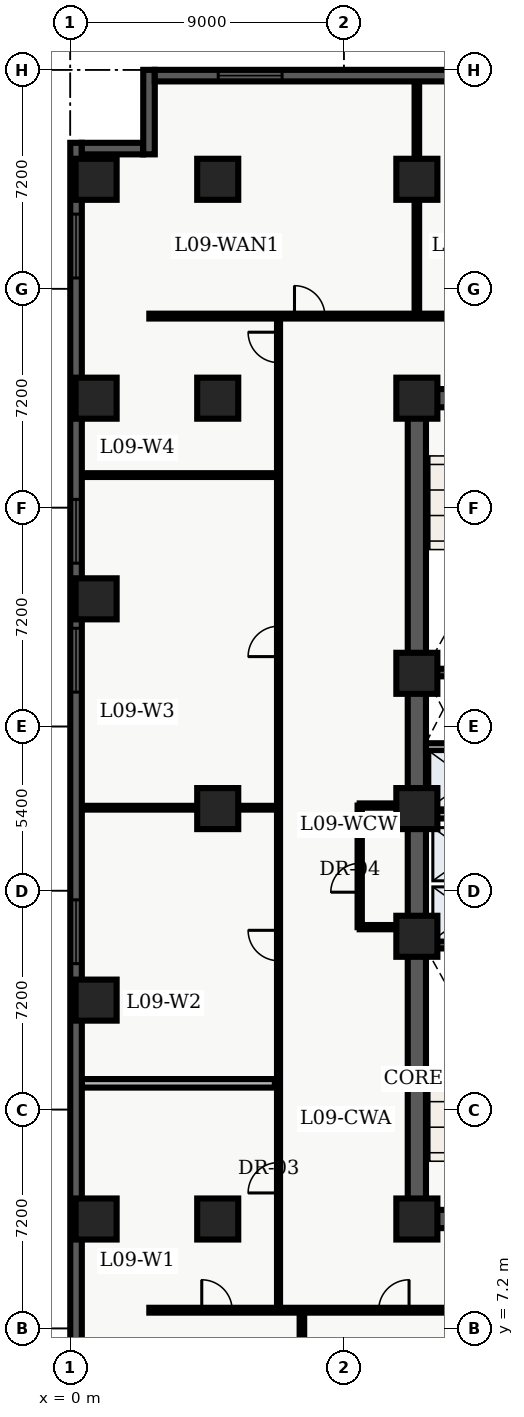
"""IFC4 building model, lengths in metres.
Left out: names, types, materials, properties, quantities, classifications, styles, units other than length and angle.
Written with IfcOpenShell. Run it as: python <this file> out.ifc"""

import sys

from ifc_helpers import new_model, entity, si_unit, converted_unit, direction, frame, origin_with_axes, origin_2d_with_axis, place, context, subcontext, project, spatial, polyline, rectangle, outline, extrude, element, fill, save


model = new_model("IFC4")
c1 = context("Model", 3, precision=1e-05, world=origin_with_axes(), true_north=direction((0.0, 1.0)))
c2 = subcontext(c1, "Body", "Model", "MODEL_VIEW")
j1 = project(units=[si_unit("LENGTHUNIT", "METRE"), converted_unit("PLANEANGLEUNIT", "DEGREE", entity("IfcPlaneAngleMeasure", 0.017), si_unit("PLANEANGLEUNIT", "RADIAN"), dimensions=[0, 0, 0, 0, 0, 0, 0])], contexts=[c1])
p1 = place(None, origin_with_axes())
s1 = spatial("IfcSite", under=j1, at=p1, CompositionType="ELEMENT")
p2 = place(p1, origin_with_axes())
s2 = spatial("IfcBuilding", under=s1, at=p2, CompositionType="ELEMENT")
p3 = place(p2, frame((0.0, 0.0, 40.5), z_axis=(0.0, 0.0, 1.0), x_axis=(1.0, 0.0, 0.0)))
s3 = spatial("IfcBuildingStorey", under=s2, at=p3, CompositionType="ELEMENT", Elevation=40.5)
p4 = place(p3, frame((11.4, 10.8, 0.0), z_axis=(0.0, 0.0, 1.0), x_axis=(0.0, 1.0, 0.0)))
e1 = element("IfcWall", 1, at=p4, inside=s3, PredefinedType="SHEAR", context=c2, shape_type="SweptSolid", body=[
    extrude(outline(polyline([(0.0, -0.3), (27.0, -0.3), (27.0, 0.3), (0.0, 0.3), (0.0, -0.3)])), origin_with_axes(), (0.0, 0.0, 1.0), 3.66),
])
p5 = place(p3, frame((11.4, 10.8, 0.0), z_axis=(0.0, 0.0, 1.0), x_axis=(1.0, 0.0, 0.0)))
e2 = element("IfcWall", 2, at=p5, inside=s3, PredefinedType="SHEAR", context=c2, shape_type="SweptSolid", body=[
    extrude(outline(polyline([(0.0, -0.3), (7.2, -0.3), (7.2, 0.3), (0.0, 0.3), (0.0, -0.3)])), origin_with_axes(), (0.0, 0.0, 1.0), 3.66),
])
p6 = place(p5, frame((2.625, 0.0, 0.0), z_axis=(0.0, 0.0, 1.0), x_axis=(1.0, 0.0, 0.0)))
e3 = element("IfcOpeningElement", 3, at=p6, cuts=e2, PredefinedType="OPENING", context=c2, shape_type="SweptSolid", body=[
    extrude(rectangle(XDim=1.05, YDim=0.62, at=origin_2d_with_axis()), origin_with_axes(), (0.0, 0.0, 1.0), 2.15),
])
p7 = place(p3, frame((11.4, 37.8, 0.0), z_axis=(0.0, 0.0, 1.0), x_axis=(1.0, 0.0, 0.0)))
e4 = element("IfcWall", 4, at=p7, inside=s3, PredefinedType="SHEAR", context=c2, shape_type="SweptSolid", body=[
    extrude(outline(polyline([(0.0, -0.3), (7.2, -0.3), (7.2, 0.3), (0.0, 0.3), (0.0, -0.3)])), origin_with_axes(), (0.0, 0.0, 1.0), 3.66),
])
p8 = place(p7, frame((2.625, 0.0, 0.0), z_axis=(0.0, 0.0, 1.0), x_axis=(1.0, 0.0, 0.0)))
e5 = element("IfcOpeningElement", 5, at=p8, cuts=e4, PredefinedType="OPENING", context=c2, shape_type="SweptSolid", body=[
    extrude(rectangle(XDim=1.05, YDim=0.62, at=origin_2d_with_axis()), origin_with_axes(), (0.0, 0.0, 1.0), 2.15),
])
for number, where, z_axis, x_axis in (
    (6, (11.7, 19.825, 0.0), (0.0, 0.0, 1.0), (1.0, 0.0, 0.0)),
    (7, (11.7, 28.775, 0.0), (0.0, 0.0, 1.0), (1.0, 0.0, 0.0)),
):
    element("IfcWall", number, at=place(p3, frame(where, z_axis=z_axis, x_axis=x_axis)), inside=s3, PredefinedType="SHEAR", context=c2, shape_type="SweptSolid", body=[
        extrude(outline(polyline([(0.0, -0.125), (6.6, -0.125), (6.6, 0.125), (0.0, 0.125), (0.0, -0.125)])), origin_with_axes(), (0.0, 0.0, 1.0), 3.66),
    ])
p9 = place(p3, frame((11.7, 24.1, 0.0), z_axis=(0.0, 0.0, 1.0), x_axis=(1.0, 0.0, 0.0)))
e8 = element("IfcWall", 8, at=p9, inside=s3, PredefinedType="SOLIDWALL", context=c2, shape_type="SweptSolid", body=[
    extrude(outline(polyline([(0.0, -0.125), (6.6, -0.125), (6.6, 0.125), (0.0, 0.125), (0.0, -0.125)])), origin_with_axes(), (0.0, 0.0, 1.0), 2.7),
])
p10 = place(p9, frame((3.75, 0.0, 0.0), z_axis=(0.0, 0.0, 1.0), x_axis=(1.0, 0.0, 0.0)))
e9 = element("IfcOpeningElement", 9, at=p10, cuts=e8, PredefinedType="OPENING", context=c2, shape_type="SweptSolid", body=[
    extrude(rectangle(XDim=0.9, YDim=0.27, at=origin_2d_with_axis()), origin_with_axes(), (0.0, 0.0, 1.0), 2.15),
])
p11 = place(p3, frame((11.7, 26.325, 0.0), z_axis=(0.0, 0.0, 1.0), x_axis=(1.0, 0.0, 0.0)))
e10 = element("IfcWall", 10, at=p11, inside=s3, PredefinedType="SOLIDWALL", context=c2, shape_type="SweptSolid", body=[
    extrude(outline(polyline([(0.0, -0.125), (6.6, -0.125), (6.6, 0.125), (0.0, 0.125), (0.0, -0.125)])), origin_with_axes(), (0.0, 0.0, 1.0), 2.7),
])
p12 = place(p11, frame((3.5, 0.0, 0.0), z_axis=(0.0, 0.0, 1.0), x_axis=(1.0, 0.0, 0.0)))
e11 = element("IfcOpeningElement", 11, at=p12, cuts=e10, PredefinedType="OPENING", context=c2, shape_type="SweptSolid", body=[
    extrude(rectangle(XDim=0.9, YDim=0.27, at=origin_2d_with_axis()), origin_with_axes(), (0.0, 0.0, 1.0), 2.15),
])
for number, where, z_axis, x_axis in (
    (12, (11.4, 10.8, 0.0), (0.0, 0.0, 1.0), (1.0, 0.0, 0.0)),
    (13, (11.4, 20.1, 0.0), (0.0, 0.0, 1.0), (1.0, 0.0, 0.0)),
    (14, (11.4, 24.3, 0.0), (0.0, 0.0, 1.0), (1.0, 0.0, 0.0)),
    (15, (11.4, 28.75, 0.0), (0.0, 0.0, 1.0), (1.0, 0.0, 0.0)),
    (16, (11.4, 37.8, 0.0), (0.0, 0.0, 1.0), (1.0, 0.0, 0.0)),
    (17, (11.4, 45.0, 0.0), (0.0, 0.0, 1.0), (1.0, 0.0, 0.0)),
    (18, (4.85, 10.8, 0.0), (0.0, 0.0, 1.0), (1.0, 0.0, 0.0)),
    (19, (4.85, 24.3, 0.0), (0.0, 0.0, 1.0), (1.0, 0.0, 0.0)),
    (20, (4.85, 37.8, 0.0), (0.0, 0.0, 1.0), (1.0, 0.0, 0.0)),
    (21, (4.85, 45.0, 0.0), (0.0, 0.0, 1.0), (1.0, 0.0, 0.0)),
    (22, (0.85, 10.8, 0.0), (0.0, 0.0, 1.0), (1.0, 0.0, 0.0)),
    (23, (0.85, 18.0, 0.0), (0.0, 0.0, 1.0), (1.0, 0.0, 0.0)),
    (24, (0.85, 31.2, 0.0), (0.0, 0.0, 1.0), (1.0, 0.0, 0.0)),
    (25, (0.85, 37.8, 0.0), (0.0, 0.0, 1.0), (1.0, 0.0, 0.0)),
    (26, (0.85, 45.0, 0.0), (0.0, 0.0, 1.0), (1.0, 0.0, 0.0)),
):
    element("IfcColumn", number, at=place(p3, frame(where, z_axis=z_axis, x_axis=x_axis)), inside=s3, PredefinedType="COLUMN", context=c2, shape_type="SweptSolid", body=[
        extrude(rectangle(XDim=1.35, YDim=1.35, at=origin_2d_with_axis()), origin_with_axes(), (0.0, 0.0, 1.0), 3.9),
    ])
p13 = place(p3, frame((9.52, 20.4, 0.0), z_axis=(0.0, 0.0, 1.0), x_axis=(0.0, 1.0, 0.0)))
e27 = element("IfcWall", 27, at=p13, inside=s3, PredefinedType="PARTITIONING", context=c2, shape_type="SweptSolid", body=[
    extrude(outline(polyline([(0.0, -0.07), (4.0, -0.07), (4.0, 0.07), (0.0, 0.07), (0.0, -0.07)])), origin_with_axes(), (0.0, 0.0, 1.0), 2.7),
])
p14 = place(p13, frame((1.625, 0.0, 0.0), z_axis=(0.0, 0.0, 1.0), x_axis=(1.0, 0.0, 0.0)))
e28 = element("IfcOpeningElement", 28, at=p14, cuts=e27, PredefinedType="OPENING", context=c2, shape_type="SweptSolid", body=[
    extrude(rectangle(XDim=0.95, YDim=0.16, at=origin_2d_with_axis()), origin_with_axes(), (0.0, 0.0, 1.0), 2.15),
])
for number, where, z_axis, x_axis in (
    (29, (9.52, 20.4, 0.0), (0.0, 0.0, 1.0), (1.0, 0.0, 0.0)),
    (30, (9.52, 24.4, 0.0), (0.0, 0.0, 1.0), (1.0, 0.0, 0.0)),
):
    element("IfcWall", number, at=place(p3, frame(where, z_axis=z_axis, x_axis=x_axis)), inside=s3, PredefinedType="PARTITIONING", context=c2, shape_type="SweptSolid", body=[
        extrude(outline(polyline([(0.0, -0.07), (1.58, -0.07), (1.58, 0.07), (0.0, 0.07), (0.0, -0.07)])), origin_with_axes(), (0.0, 0.0, 1.0), 2.7),
    ])
p15 = place(p3, frame((2.6, 7.8, 0.0), z_axis=(0.0, 0.0, 1.0), x_axis=(1.0, 0.0, 0.0)))
e31 = element("IfcWall", 31, at=p15, inside=s3, PredefinedType="PARTITIONING", context=c2, shape_type="SweptSolid", body=[
    extrude(outline(polyline([(0.0, -0.08), (18.55, -0.08), (18.55, 0.08), (0.0, 0.08), (0.0, -0.08)])), origin_with_axes(), (0.0, 0.0, 1.0), 2.7),
])
p16 = place(p15, frame((2.225, 0.0, 0.0), z_axis=(0.0, 0.0, 1.0), x_axis=(1.0, 0.0, 0.0)))
e32 = element("IfcOpeningElement", 32, at=p16, cuts=e31, PredefinedType="OPENING", context=c2, shape_type="SweptSolid", body=[
    extrude(rectangle(XDim=1.0, YDim=0.18, at=origin_2d_with_axis()), origin_with_axes(), (0.0, 0.0, 1.0), 2.15),
])
p17 = place(p15, frame((8.043, 0.0, 0.0), z_axis=(0.0, 0.0, 1.0), x_axis=(1.0, 0.0, 0.0)))
e33 = element("IfcOpeningElement", 33, at=p17, cuts=e31, PredefinedType="OPENING", context=c2, shape_type="SweptSolid", body=[
    extrude(rectangle(XDim=1.0, YDim=0.18, at=origin_2d_with_axis()), origin_with_axes(), (0.0, 0.0, 1.0), 2.15),
])
p18 = place(p15, frame((14.784, 0.0, 0.0), z_axis=(0.0, 0.0, 1.0), x_axis=(1.0, 0.0, 0.0)))
e34 = element("IfcOpeningElement", 34, at=p18, cuts=e31, PredefinedType="OPENING", context=c2, shape_type="SweptSolid", body=[
    extrude(rectangle(XDim=1.0, YDim=0.18, at=origin_2d_with_axis()), origin_with_axes(), (0.0, 0.0, 1.0), 2.15),
])
p19 = place(p3, frame((2.6, 40.5, 0.0), z_axis=(0.0, 0.0, 1.0), x_axis=(1.0, 0.0, 0.0)))
e35 = element("IfcWall", 35, at=p19, inside=s3, PredefinedType="PARTITIONING", context=c2, shape_type="SweptSolid", body=[
    extrude(outline(polyline([(0.0, -0.08), (18.65, -0.08), (18.65, 0.08), (0.0, 0.08), (0.0, -0.08)])), origin_with_axes(), (0.0, 0.0, 1.0), 2.7),
])
p20 = place(p19, frame((5.275, 0.0, 0.0), z_axis=(0.0, 0.0, 1.0), x_axis=(1.0, 0.0, 0.0)))
e36 = element("IfcOpeningElement", 36, at=p20, cuts=e35, PredefinedType="OPENING", context=c2, shape_type="SweptSolid", body=[
    extrude(rectangle(XDim=1.0, YDim=0.18, at=origin_2d_with_axis()), origin_with_axes(), (0.0, 0.0, 1.0), 2.15),
])
p21 = place(p19, frame((12.61, 0.0, 0.0), z_axis=(0.0, 0.0, 1.0), x_axis=(1.0, 0.0, 0.0)))
e37 = element("IfcOpeningElement", 37, at=p21, cuts=e35, PredefinedType="OPENING", context=c2, shape_type="SweptSolid", body=[
    extrude(rectangle(XDim=1.2, YDim=0.18, at=origin_2d_with_axis()), origin_with_axes(), (0.0, 0.0, 1.0), 2.2),
])
p22 = place(p3, frame((6.85, 7.8, 0.0), z_axis=(0.0, 0.0, 1.0), x_axis=(0.0, 1.0, 0.0)))
e38 = element("IfcWall", 38, at=p22, inside=s3, PredefinedType="PARTITIONING", context=c2, shape_type="SweptSolid", body=[
    extrude(outline(polyline([(0.0, -0.05), (32.7, -0.05), (32.7, 0.05), (0.0, 0.05), (0.0, -0.05)])), origin_with_axes(), (0.0, 0.0, 1.0), 2.7),
])
p23 = place(p22, frame((4.357, 0.0, 0.0), z_axis=(0.0, 0.0, 1.0), x_axis=(1.0, 0.0, 0.0)))
e39 = element("IfcOpeningElement", 39, at=p23, cuts=e38, PredefinedType="OPENING", context=c2, shape_type="SweptSolid", body=[
    extrude(rectangle(XDim=1.0, YDim=0.12, at=origin_2d_with_axis()), origin_with_axes(), (0.0, 0.0, 1.0), 2.15),
])
p24 = place(p22, frame((11.996, 0.0, 0.0), z_axis=(0.0, 0.0, 1.0), x_axis=(1.0, 0.0, 0.0)))
e40 = element("IfcOpeningElement", 40, at=p24, cuts=e38, PredefinedType="OPENING", context=c2, shape_type="SweptSolid", body=[
    extrude(rectangle(XDim=1.0, YDim=0.12, at=origin_2d_with_axis()), origin_with_axes(), (0.0, 0.0, 1.0), 2.15),
])
p25 = place(p22, frame((22.0, 0.0, 0.0), z_axis=(0.0, 0.0, 1.0), x_axis=(1.0, 0.0, 0.0)))
e41 = element("IfcOpeningElement", 41, at=p25, cuts=e38, PredefinedType="OPENING", context=c2, shape_type="SweptSolid", body=[
    extrude(rectangle(XDim=1.0, YDim=0.12, at=origin_2d_with_axis()), origin_with_axes(), (0.0, 0.0, 1.0), 2.15),
])
p26 = place(p22, frame((31.67, 0.0, 0.0), z_axis=(0.0, 0.0, 1.0), x_axis=(1.0, 0.0, 0.0)))
e42 = element("IfcOpeningElement", 42, at=p26, cuts=e38, PredefinedType="OPENING", context=c2, shape_type="SweptSolid", body=[
    extrude(rectangle(XDim=1.0, YDim=0.12, at=origin_2d_with_axis()), origin_with_axes(), (0.0, 0.0, 1.0), 2.15),
])
p27 = place(p3, frame((0.375, 15.263, 0.0), z_axis=(0.0, 0.0, 1.0), x_axis=(1.0, 0.0, 0.0)))
e43 = element("IfcWall", 43, at=p27, inside=s3, PredefinedType="PARTITIONING", context=c2, shape_type="SweptSolid", body=[
    extrude(outline(polyline([(0.0, -0.14), (6.355, -0.14), (6.355, 0.14), (0.0, 0.14), (0.0, -0.14)])), origin_with_axes(), (0.0, 0.0, 1.0), 2.7),
])
for number, where, z_axis, x_axis in (
    (44, (0.375, 24.329, 0.0), (0.0, 0.0, 1.0), (1.0, 0.0, 0.0)),
    (45, (0.375, 35.27, 0.0), (0.0, 0.0, 1.0), (1.0, 0.0, 0.0)),
):
    element("IfcWall", number, at=place(p3, frame(where, z_axis=z_axis, x_axis=x_axis)), inside=s3, PredefinedType="PARTITIONING", context=c2, shape_type="SweptSolid", body=[
        extrude(outline(polyline([(0.0, -0.062), (6.355, -0.062), (6.355, 0.062), (0.0, 0.062), (0.0, -0.062)])), origin_with_axes(), (0.0, 0.0, 1.0), 2.7),
    ])
p28 = place(p3, frame((7.619, 0.36, 0.0), z_axis=(0.0, 0.0, 1.0), x_axis=(0.0, 1.0, 0.0)))
e46 = element("IfcWall", 46, at=p28, inside=s3, PredefinedType="PARTITIONING", context=c2, shape_type="SweptSolid", body=[
    extrude(outline(polyline([(0.0, -0.075), (7.34, -0.075), (7.34, 0.075), (0.0, 0.075), (0.0, -0.075)])), origin_with_axes(), (0.0, 0.0, 1.0), 2.7),
])
p29 = place(p3, frame((11.4, 40.6, 0.0), z_axis=(0.0, 0.0, 1.0), x_axis=(0.0, 1.0, 0.0)))
e47 = element("IfcWall", 47, at=p29, inside=s3, PredefinedType="PARTITIONING", context=c2, shape_type="SweptSolid", body=[
    extrude(outline(polyline([(0.0, -0.075), (7.64, -0.075), (7.64, 0.075), (0.0, 0.075), (0.0, -0.075)])), origin_with_axes(), (0.0, 0.0, 1.0), 2.7),
])
p30 = place(p3, frame((0.19, 2.78, 0.0), z_axis=(0.0, 0.0, 1.0), x_axis=(0.0, 1.0, 0.0)))
e48 = element("IfcWall", 48, at=p30, inside=s3, PredefinedType="SOLIDWALL", context=c2, shape_type="SweptSolid", body=[
    extrude(outline(polyline([(0.0, -0.19), (43.42, -0.19), (43.42, 0.19), (0.0, 0.19), (0.0, -0.19)])), origin_with_axes(), (0.0, 0.0, 1.0), 3.66),
])
p31 = place(p30, frame((2.946, 0.0, 0.45), z_axis=(0.0, 0.0, 1.0), x_axis=(1.0, 0.0, 0.0)))
e49 = element("IfcOpeningElement", 49, at=p31, cuts=e48, PredefinedType="OPENING", context=c2, shape_type="SweptSolid", body=[
    extrude(rectangle(XDim=2.1, YDim=0.4, at=origin_2d_with_axis()), origin_with_axes(), (0.0, 0.0, 1.0), 2.2),
])
p32 = place(p30, frame((17.469, 0.0, 0.45), z_axis=(0.0, 0.0, 1.0), x_axis=(1.0, 0.0, 0.0)))
e50 = element("IfcOpeningElement", 50, at=p32, cuts=e48, PredefinedType="OPENING", context=c2, shape_type="SweptSolid", body=[
    extrude(rectangle(XDim=2.1, YDim=0.4, at=origin_2d_with_axis()), origin_with_axes(), (0.0, 0.0, 1.0), 2.2),
])
p33 = place(p30, frame((26.401, 0.0, 0.45), z_axis=(0.0, 0.0, 1.0), x_axis=(1.0, 0.0, 0.0)))
e51 = element("IfcOpeningElement", 51, at=p33, cuts=e48, PredefinedType="OPENING", context=c2, shape_type="SweptSolid", body=[
    extrude(rectangle(XDim=2.1, YDim=0.4, at=origin_2d_with_axis()), origin_with_axes(), (0.0, 0.0, 1.0), 2.2),
])
p34 = place(p30, frame((30.642, 0.0, 0.45), z_axis=(0.0, 0.0, 1.0), x_axis=(1.0, 0.0, 0.0)))
e52 = element("IfcOpeningElement", 52, at=p34, cuts=e48, PredefinedType="OPENING", context=c2, shape_type="SweptSolid", body=[
    extrude(rectangle(XDim=2.1, YDim=0.4, at=origin_2d_with_axis()), origin_with_axes(), (0.0, 0.0, 1.0), 2.2),
])
p35 = place(p30, frame((40.024, 0.0, 0.45), z_axis=(0.0, 0.0, 1.0), x_axis=(1.0, 0.0, 0.0)))
e53 = element("IfcOpeningElement", 53, at=p35, cuts=e48, PredefinedType="OPENING", context=c2, shape_type="SweptSolid", body=[
    extrude(rectangle(XDim=2.1, YDim=0.4, at=origin_2d_with_axis()), origin_with_axes(), (0.0, 0.0, 1.0), 2.2),
])
p36 = place(p3, frame((0.38, 46.01, 0.0), z_axis=(0.0, 0.0, 1.0), x_axis=(1.0, 0.0, 0.0)))
e54 = element("IfcWall", 54, at=p36, inside=s3, PredefinedType="SOLIDWALL", context=c2, shape_type="SweptSolid", body=[
    extrude(outline(polyline([(0.0, -0.19), (2.02, -0.19), (2.02, 0.19), (0.0, 0.19), (0.0, -0.19)])), origin_with_axes(), (0.0, 0.0, 1.0), 3.66),
])
p37 = place(p3, frame((2.59, 45.82, 0.0), z_axis=(0.0, 0.0, 1.0), x_axis=(0.0, 1.0, 0.0)))
e55 = element("IfcWall", 55, at=p37, inside=s3, PredefinedType="SOLIDWALL", context=c2, shape_type="SweptSolid", body=[
    extrude(outline(polyline([(0.0, -0.19), (2.78, -0.19), (2.78, 0.19), (0.0, 0.19), (0.0, -0.19)])), origin_with_axes(), (0.0, 0.0, 1.0), 3.66),
])
p38 = place(p3, frame((2.78, 48.41, 0.0), z_axis=(0.0, 0.0, 1.0), x_axis=(1.0, 0.0, 0.0)))
e56 = element("IfcWall", 56, at=p38, inside=s3, PredefinedType="SOLIDWALL", context=c2, shape_type="SweptSolid", body=[
    extrude(outline(polyline([(0.0, -0.19), (16.42, -0.19), (16.42, 0.19), (0.0, 0.19), (0.0, -0.19)])), origin_with_axes(), (0.0, 0.0, 1.0), 3.66),
])
p39 = place(p38, frame((3.137, 0.0, 0.45), z_axis=(0.0, 0.0, 1.0), x_axis=(1.0, 0.0, 0.0)))
e57 = element("IfcOpeningElement", 57, at=p39, cuts=e56, PredefinedType="OPENING", context=c2, shape_type="SweptSolid", body=[
    extrude(rectangle(XDim=2.1, YDim=0.4, at=origin_2d_with_axis()), origin_with_axes(), (0.0, 0.0, 1.0), 2.2),
])
p40 = place(p38, frame((13.283, 0.0, 0.45), z_axis=(0.0, 0.0, 1.0), x_axis=(1.0, 0.0, 0.0)))
e58 = element("IfcOpeningElement", 58, at=p40, cuts=e56, PredefinedType="OPENING", context=c2, shape_type="SweptSolid", body=[
    extrude(rectangle(XDim=2.1, YDim=0.4, at=origin_2d_with_axis()), origin_with_axes(), (0.0, 0.0, 1.0), 2.2),
])
p41 = place(p13, frame((1.625, 0.0, 0.0), z_axis=(0.0, 0.0, 1.0), x_axis=(1.0, 0.0, 0.0)))
e59 = element("IfcDoor", 59, at=p41, inside=s3, OperationType="SINGLE_SWING_LEFT", PredefinedType="DOOR", context=c2, shape_type="SweptSolid", body=[
    extrude(rectangle(XDim=0.95, YDim=0.084, at=origin_2d_with_axis()), origin_with_axes(), (0.0, 0.0, 1.0), 2.15),
])
fill(e28, e59)
p42 = place(p22, frame((4.357, 0.0, 0.0), z_axis=(0.0, 0.0, 1.0), x_axis=(1.0, 0.0, 0.0)))
e60 = element("IfcDoor", 60, at=p42, inside=s3, OperationType="SINGLE_SWING_LEFT", PredefinedType="DOOR", context=c2, shape_type="SweptSolid", body=[
    extrude(rectangle(XDim=1.0, YDim=0.06, at=origin_2d_with_axis()), origin_with_axes(), (0.0, 0.0, 1.0), 2.15),
])
fill(e39, e60)
p43 = place(p22, frame((11.996, 0.0, 0.0), z_axis=(0.0, 0.0, 1.0), x_axis=(1.0, 0.0, 0.0)))
e61 = element("IfcDoor", 61, at=p43, inside=s3, OperationType="SINGLE_SWING_RIGHT", PredefinedType="DOOR", context=c2, shape_type="SweptSolid", body=[
    extrude(rectangle(XDim=1.0, YDim=0.06, at=origin_2d_with_axis()), origin_with_axes(), (0.0, 0.0, 1.0), 2.15),
])
fill(e40, e61)
p44 = place(p22, frame((22.0, 0.0, 0.0), z_axis=(0.0, 0.0, 1.0), x_axis=(1.0, 0.0, 0.0)))
e62 = element("IfcDoor", 62, at=p44, inside=s3, OperationType="SINGLE_SWING_LEFT", PredefinedType="DOOR", context=c2, shape_type="SweptSolid", body=[
    extrude(rectangle(XDim=1.0, YDim=0.06, at=origin_2d_with_axis()), origin_with_axes(), (0.0, 0.0, 1.0), 2.15),
])
fill(e41, e62)
p45 = place(p22, frame((31.67, 0.0, 0.0), z_axis=(0.0, 0.0, 1.0), x_axis=(1.0, 0.0, 0.0)))
e63 = element("IfcDoor", 63, at=p45, inside=s3, OperationType="SINGLE_SWING_RIGHT", PredefinedType="DOOR", context=c2, shape_type="SweptSolid", body=[
    extrude(rectangle(XDim=1.0, YDim=0.06, at=origin_2d_with_axis()), origin_with_axes(), (0.0, 0.0, 1.0), 2.15),
])
fill(e42, e63)
p46 = place(p15, frame((2.225, 0.0, 0.0), z_axis=(0.0, 0.0, 1.0), x_axis=(1.0, 0.0, 0.0)))
e64 = element("IfcDoor", 64, at=p46, inside=s3, OperationType="SINGLE_SWING_LEFT", PredefinedType="DOOR", context=c2, shape_type="SweptSolid", body=[
    extrude(rectangle(XDim=1.0, YDim=0.09, at=origin_2d_with_axis()), origin_with_axes(), (0.0, 0.0, 1.0), 2.15),
])
fill(e32, e64)
p47 = place(p15, frame((8.043, 0.0, 0.0), z_axis=(0.0, 0.0, 1.0), x_axis=(1.0, 0.0, 0.0)))
e65 = element("IfcDoor", 65, at=p47, inside=s3, OperationType="SINGLE_SWING_RIGHT", PredefinedType="DOOR", context=c2, shape_type="SweptSolid", body=[
    extrude(rectangle(XDim=1.0, YDim=0.09, at=origin_2d_with_axis()), origin_with_axes(), (0.0, 0.0, 1.0), 2.15),
])
fill(e33, e65)
p48 = place(p19, frame((5.275, 0.0, 0.0), z_axis=(0.0, 0.0, 1.0), x_axis=(1.0, 0.0, 0.0)))
e66 = element("IfcDoor", 66, at=p48, inside=s3, OperationType="SINGLE_SWING_LEFT", PredefinedType="DOOR", context=c2, shape_type="SweptSolid", body=[
    extrude(rectangle(XDim=1.0, YDim=0.09, at=origin_2d_with_axis()), origin_with_axes(), (0.0, 0.0, 1.0), 2.15),
])
fill(e36, e66)
p49 = place(p30, frame((17.469, 0.0, 0.45), z_axis=(0.0, 0.0, 1.0), x_axis=(1.0, 0.0, 0.0)))
e67 = element("IfcWindow", 67, at=p49, inside=s3, PredefinedType="WINDOW", context=c2, shape_type="SweptSolid", body=[
    extrude(rectangle(XDim=2.1, YDim=0.09, at=origin_2d_with_axis()), origin_with_axes(), (0.0, 0.0, 1.0), 2.2),
])
fill(e50, e67)
p50 = place(p30, frame((26.401, 0.0, 0.45), z_axis=(0.0, 0.0, 1.0), x_axis=(1.0, 0.0, 0.0)))
e68 = element("IfcWindow", 68, at=p50, inside=s3, PredefinedType="WINDOW", context=c2, shape_type="SweptSolid", body=[
    extrude(rectangle(XDim=2.1, YDim=0.09, at=origin_2d_with_axis()), origin_with_axes(), (0.0, 0.0, 1.0), 2.2),
])
fill(e51, e68)
p51 = place(p30, frame((30.642, 0.0, 0.45), z_axis=(0.0, 0.0, 1.0), x_axis=(1.0, 0.0, 0.0)))
e69 = element("IfcWindow", 69, at=p51, inside=s3, PredefinedType="WINDOW", context=c2, shape_type="SweptSolid", body=[
    extrude(rectangle(XDim=2.1, YDim=0.09, at=origin_2d_with_axis()), origin_with_axes(), (0.0, 0.0, 1.0), 2.2),
])
fill(e52, e69)
p52 = place(p30, frame((40.024, 0.0, 0.45), z_axis=(0.0, 0.0, 1.0), x_axis=(1.0, 0.0, 0.0)))
e70 = element("IfcWindow", 70, at=p52, inside=s3, PredefinedType="WINDOW", context=c2, shape_type="SweptSolid", body=[
    extrude(rectangle(XDim=2.1, YDim=0.09, at=origin_2d_with_axis()), origin_with_axes(), (0.0, 0.0, 1.0), 2.2),
])
fill(e53, e70)
p53 = place(p38, frame((3.137, 0.0, 0.45), z_axis=(0.0, 0.0, 1.0), x_axis=(1.0, 0.0, 0.0)))
e71 = element("IfcWindow", 71, at=p53, inside=s3, PredefinedType="WINDOW", context=c2, shape_type="SweptSolid", body=[
    extrude(rectangle(XDim=2.1, YDim=0.09, at=origin_2d_with_axis()), origin_with_axes(), (0.0, 0.0, 1.0), 2.2),
])
fill(e57, e71)
save(model, sys.argv[1])
